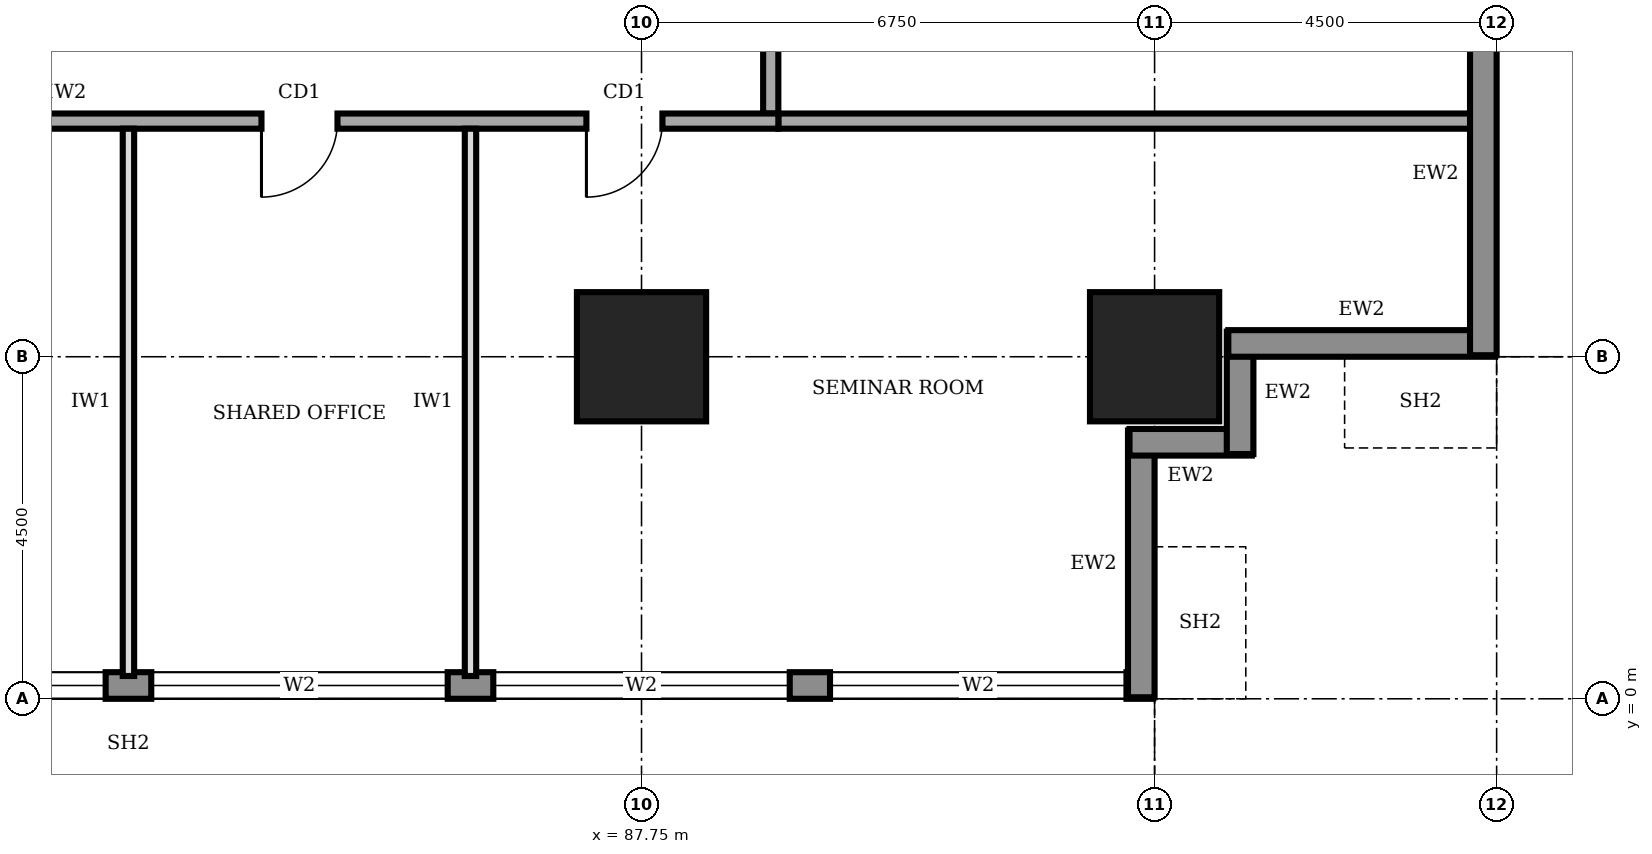
"""IFC4 building model, lengths in metres.
Left out: names, types, materials, properties, quantities, classifications, styles, units other than length and angle.
Written with IfcOpenShell. Run it as: python <this file> out.ifc"""

import sys

from ifc_helpers import new_model, si_unit, direction, frame, frame_2d, origin, origin_2d, place, context, subcontext, project, spatial, rectangle, extrude, element, fill, save


model = new_model("IFC4")
c1 = context("Model", 3, precision=1e-05, world=origin(), true_north=direction((0.0, 1.0)))
c2 = subcontext(c1, "Body", "Model", "MODEL_VIEW")
j1 = project(units=[si_unit("LENGTHUNIT", "METRE"), si_unit("PLANEANGLEUNIT", "RADIAN")], contexts=[c1])
p1 = place(None, origin())
s1 = spatial("IfcSite", under=j1, at=p1, CompositionType="ELEMENT")
p2 = place(p1, origin())
s2 = spatial("IfcBuilding", under=s1, at=p2, CompositionType="ELEMENT")
p3 = place(p2, frame((0.0, 0.0, 69.0)))
s3 = spatial("IfcBuildingStorey", under=s2, at=p3, CompositionType="ELEMENT", Elevation=69.0)
for number, where, z_axis, x_axis in (
    (1, (87.75, 4.5, 0.0), (0.0, 0.0, 1.0), (1.0, 0.0, 0.0)),
    (2, (94.5, 4.5, 0.0), (0.0, 0.0, 1.0), (1.0, 0.0, 0.0)),
):
    element("IfcColumn", number, at=place(p3, frame(where, z_axis=z_axis, x_axis=x_axis)), inside=s3, PredefinedType="COLUMN", context=c2, shape_type="SweptSolid", body=[
        extrude(rectangle(XDim=1.7, YDim=1.7, at=origin_2d()), origin(), (0.0, 0.0, 1.0), 4.0),
    ])
p4 = place(p3, frame((67.52, 0.175, 0.0), z_axis=(0.0, 0.0, 1.0), x_axis=(1.0, 0.0, 0.0)))
e3 = element("IfcWall", 3, at=p4, inside=s3, PredefinedType="STANDARD", context=c2, shape_type="SweptSolid", body=[
    extrude(rectangle(XDim=26.96, YDim=0.35, at=frame_2d((13.48, 0.0))), origin(), (0.0, 0.0, 1.0), 3.75),
])
p5 = place(p4, frame((4.78, 0.0, 0.6)))
e4 = element("IfcOpeningElement", 4, at=p5, cuts=e3, PredefinedType="OPENING", context=c2, shape_type="SweptSolid", body=[
    extrude(rectangle(XDim=3.9, YDim=2.6, at=frame_2d((1.95, 1.3))), frame((0.0, 0.185, 0.0), z_axis=(0.0, -1.0, 0.0), x_axis=(1.0, 0.0, 0.0)), (0.0, 0.0, 1.0), 0.37),
])
p6 = place(p4, frame((9.28, 0.0, 0.6)))
e5 = element("IfcOpeningElement", 5, at=p6, cuts=e3, PredefinedType="OPENING", context=c2, shape_type="SweptSolid", body=[
    extrude(rectangle(XDim=3.9, YDim=2.6, at=frame_2d((1.95, 1.3))), frame((0.0, 0.185, 0.0), z_axis=(0.0, -1.0, 0.0), x_axis=(1.0, 0.0, 0.0)), (0.0, 0.0, 1.0), 0.37),
])
p7 = place(p4, frame((13.78, 0.0, 0.6)))
e6 = element("IfcOpeningElement", 6, at=p7, cuts=e3, PredefinedType="OPENING", context=c2, shape_type="SweptSolid", body=[
    extrude(rectangle(XDim=3.9, YDim=2.6, at=frame_2d((1.95, 1.3))), frame((0.0, 0.185, 0.0), z_axis=(0.0, -1.0, 0.0), x_axis=(1.0, 0.0, 0.0)), (0.0, 0.0, 1.0), 0.37),
])
p8 = place(p4, frame((18.28, 0.0, 0.6)))
e7 = element("IfcOpeningElement", 7, at=p8, cuts=e3, PredefinedType="OPENING", context=c2, shape_type="SweptSolid", body=[
    extrude(rectangle(XDim=3.9, YDim=2.6, at=frame_2d((1.95, 1.3))), frame((0.0, 0.185, 0.0), z_axis=(0.0, -1.0, 0.0), x_axis=(1.0, 0.0, 0.0)), (0.0, 0.0, 1.0), 0.37),
])
p9 = place(p4, frame((22.71, 0.0, 0.6)))
e8 = element("IfcOpeningElement", 8, at=p9, cuts=e3, PredefinedType="OPENING", context=c2, shape_type="SweptSolid", body=[
    extrude(rectangle(XDim=3.9, YDim=2.6, at=frame_2d((1.95, 1.3))), frame((0.0, 0.185, 0.0), z_axis=(0.0, -1.0, 0.0), x_axis=(1.0, 0.0, 0.0)), (0.0, 0.0, 1.0), 0.37),
])
p10 = place(p3, frame((94.325, 0.02, 0.0), z_axis=(0.0, 0.0, 1.0), x_axis=(0.0, 1.0, 0.0)))
e9 = element("IfcWall", 9, at=p10, inside=s3, PredefinedType="STANDARD", context=c2, shape_type="SweptSolid", body=[
    extrude(rectangle(XDim=3.51, YDim=0.35, at=frame_2d((1.755, 0.0))), origin(), (0.0, 0.0, 1.0), 2.85),
])
for number, where, z_axis, x_axis in (
    (10, (94.17, 3.375, 0.0), (0.0, 0.0, 1.0), (1.0, 0.0, 0.0)),
    (11, (95.625, 3.22, 0.0), (0.0, 0.0, 1.0), (0.0, 1.0, 0.0)),
):
    element("IfcWall", number, at=place(p3, frame(where, z_axis=z_axis, x_axis=x_axis)), inside=s3, PredefinedType="STANDARD", context=c2, shape_type="SweptSolid", body=[
        extrude(rectangle(XDim=1.61, YDim=0.35, at=frame_2d((0.805, 0.0))), origin(), (0.0, 0.0, 1.0), 3.75),
    ])
p11 = place(p3, frame((95.47, 4.675, 0.0), z_axis=(0.0, 0.0, 1.0), x_axis=(1.0, 0.0, 0.0)))
e12 = element("IfcWall", 12, at=p11, inside=s3, PredefinedType="STANDARD", context=c2, shape_type="SweptSolid", body=[
    extrude(rectangle(XDim=3.51, YDim=0.35, at=frame_2d((1.755, 0.0))), origin(), (0.0, 0.0, 1.0), 2.85),
])
p12 = place(p3, frame((98.825, 4.52, 0.0), z_axis=(0.0, 0.0, 1.0), x_axis=(0.0, 1.0, 0.0)))
e13 = element("IfcWall", 13, at=p12, inside=s3, PredefinedType="STANDARD", context=c2, shape_type="SweptSolid", body=[
    extrude(rectangle(XDim=31.46, YDim=0.35, at=frame_2d((15.73, 0.0))), origin(), (0.0, 0.0, 1.0), 3.75),
])
p13 = place(p12, frame((4.78, 0.0, 0.6)))
e14 = element("IfcOpeningElement", 14, at=p13, cuts=e13, PredefinedType="OPENING", context=c2, shape_type="SweptSolid", body=[
    extrude(rectangle(XDim=3.9, YDim=2.6, at=frame_2d((1.95, 1.3))), frame((0.0, 0.185, 0.0), z_axis=(0.0, -1.0, 0.0), x_axis=(1.0, 0.0, 0.0)), (0.0, 0.0, 1.0), 0.37),
])
p14 = place(p12, frame((9.28, 0.0, 0.6)))
e15 = element("IfcOpeningElement", 15, at=p14, cuts=e13, PredefinedType="OPENING", context=c2, shape_type="SweptSolid", body=[
    extrude(rectangle(XDim=3.9, YDim=2.6, at=frame_2d((1.95, 1.3))), frame((0.0, 0.185, 0.0), z_axis=(0.0, -1.0, 0.0), x_axis=(1.0, 0.0, 0.0)), (0.0, 0.0, 1.0), 0.37),
])
p15 = place(p12, frame((13.78, 0.0, 0.6)))
e16 = element("IfcOpeningElement", 16, at=p15, cuts=e13, PredefinedType="OPENING", context=c2, shape_type="SweptSolid", body=[
    extrude(rectangle(XDim=3.9, YDim=2.6, at=frame_2d((1.95, 1.3))), frame((0.0, 0.185, 0.0), z_axis=(0.0, -1.0, 0.0), x_axis=(1.0, 0.0, 0.0)), (0.0, 0.0, 1.0), 0.37),
])
p16 = place(p12, frame((18.28, 0.0, 0.6)))
e17 = element("IfcOpeningElement", 17, at=p16, cuts=e13, PredefinedType="OPENING", context=c2, shape_type="SweptSolid", body=[
    extrude(rectangle(XDim=3.9, YDim=2.6, at=frame_2d((1.95, 1.3))), frame((0.0, 0.185, 0.0), z_axis=(0.0, -1.0, 0.0), x_axis=(1.0, 0.0, 0.0)), (0.0, 0.0, 1.0), 0.37),
])
p17 = place(p12, frame((22.78, 0.0, 0.6)))
e18 = element("IfcOpeningElement", 18, at=p17, cuts=e13, PredefinedType="OPENING", context=c2, shape_type="SweptSolid", body=[
    extrude(rectangle(XDim=3.9, YDim=2.6, at=frame_2d((1.95, 1.3))), frame((0.0, 0.185, 0.0), z_axis=(0.0, -1.0, 0.0), x_axis=(1.0, 0.0, 0.0)), (0.0, 0.0, 1.0), 0.37),
])
p18 = place(p12, frame((27.21, 0.0, 0.6)))
e19 = element("IfcOpeningElement", 19, at=p18, cuts=e13, PredefinedType="OPENING", context=c2, shape_type="SweptSolid", body=[
    extrude(rectangle(XDim=3.9, YDim=2.6, at=frame_2d((1.95, 1.3))), frame((0.0, 0.185, 0.0), z_axis=(0.0, -1.0, 0.0), x_axis=(1.0, 0.0, 0.0)), (0.0, 0.0, 1.0), 0.37),
])
p19 = place(p3, frame((72.65, 7.6, 0.0), z_axis=(0.0, 0.0, 1.0), x_axis=(1.0, 0.0, 0.0)))
e20 = element("IfcWall", 20, at=p19, inside=s3, PredefinedType="SOLIDWALL", context=c2, shape_type="SweptSolid", body=[
    extrude(rectangle(XDim=16.9, YDim=0.2, at=frame_2d((8.45, 0.0))), origin(), (0.0, 0.0, 1.0), 3.75),
])
p20 = place(p19, frame((3.175, 0.0, 0.0)))
e21 = element("IfcOpeningElement", 21, at=p20, cuts=e20, PredefinedType="OPENING", context=c2, shape_type="SweptSolid", body=[
    extrude(rectangle(XDim=1.8, YDim=2.1, at=frame_2d((0.9, 1.05))), frame((0.0, 0.11, 0.0), z_axis=(0.0, -1.0, 0.0), x_axis=(1.0, 0.0, 0.0)), (0.0, 0.0, 1.0), 0.22),
])
p21 = place(p19, frame((10.1, 0.0, 0.0)))
e22 = element("IfcOpeningElement", 22, at=p21, cuts=e20, PredefinedType="OPENING", context=c2, shape_type="SweptSolid", body=[
    extrude(rectangle(XDim=1.0, YDim=2.1, at=frame_2d((0.5, 1.05))), frame((0.0, 0.11, 0.0), z_axis=(0.0, -1.0, 0.0), x_axis=(1.0, 0.0, 0.0)), (0.0, 0.0, 1.0), 0.22),
])
p22 = place(p19, frame((14.375, 0.0, 0.0)))
e23 = element("IfcOpeningElement", 23, at=p22, cuts=e20, PredefinedType="OPENING", context=c2, shape_type="SweptSolid", body=[
    extrude(rectangle(XDim=1.0, YDim=2.1, at=frame_2d((0.5, 1.05))), frame((0.0, 0.11, 0.0), z_axis=(0.0, -1.0, 0.0), x_axis=(1.0, 0.0, 0.0)), (0.0, 0.0, 1.0), 0.22),
])
p23 = place(p3, frame((89.45, 7.7, 0.0), z_axis=(0.0, 0.0, 1.0), x_axis=(0.0, 1.0, 0.0)))
e24 = element("IfcWall", 24, at=p23, inside=s3, PredefinedType="SOLIDWALL", context=c2, shape_type="SweptSolid", body=[
    extrude(rectangle(XDim=25.3, YDim=0.2, at=frame_2d((12.65, 0.0))), origin(), (0.0, 0.0, 1.0), 3.75),
])
p24 = place(p23, frame((2.3, 0.0, 0.0)))
e25 = element("IfcOpeningElement", 25, at=p24, cuts=e24, PredefinedType="OPENING", context=c2, shape_type="SweptSolid", body=[
    extrude(rectangle(XDim=1.0, YDim=2.1, at=frame_2d((0.5, 1.05))), frame((0.0, 0.11, 0.0), z_axis=(0.0, -1.0, 0.0), x_axis=(1.0, 0.0, 0.0)), (0.0, 0.0, 1.0), 0.22),
])
p25 = place(p23, frame((6.55, 0.0, 0.0)))
e26 = element("IfcOpeningElement", 26, at=p25, cuts=e24, PredefinedType="OPENING", context=c2, shape_type="SweptSolid", body=[
    extrude(rectangle(XDim=0.9, YDim=2.1, at=frame_2d((0.45, 1.05))), frame((0.0, 0.11, 0.0), z_axis=(0.0, -1.0, 0.0), x_axis=(1.0, 0.0, 0.0)), (0.0, 0.0, 1.0), 0.22),
])
p26 = place(p23, frame((9.75, 0.0, 0.0)))
e27 = element("IfcOpeningElement", 27, at=p26, cuts=e24, PredefinedType="OPENING", context=c2, shape_type="SweptSolid", body=[
    extrude(rectangle(XDim=0.9, YDim=2.1, at=frame_2d((0.45, 1.05))), frame((0.0, 0.11, 0.0), z_axis=(0.0, -1.0, 0.0), x_axis=(1.0, 0.0, 0.0)), (0.0, 0.0, 1.0), 0.22),
])
p27 = place(p23, frame((15.3, 0.0, 0.0)))
e28 = element("IfcOpeningElement", 28, at=p27, cuts=e24, PredefinedType="OPENING", context=c2, shape_type="SweptSolid", body=[
    extrude(rectangle(XDim=0.9, YDim=2.1, at=frame_2d((0.45, 1.05))), frame((0.0, 0.11, 0.0), z_axis=(0.0, -1.0, 0.0), x_axis=(1.0, 0.0, 0.0)), (0.0, 0.0, 1.0), 0.22),
])
p28 = place(p23, frame((17.8, 0.0, 0.0)))
e29 = element("IfcOpeningElement", 29, at=p28, cuts=e24, PredefinedType="OPENING", context=c2, shape_type="SweptSolid", body=[
    extrude(rectangle(XDim=1.0, YDim=2.1, at=frame_2d((0.5, 1.05))), frame((0.0, 0.11, 0.0), z_axis=(0.0, -1.0, 0.0), x_axis=(1.0, 0.0, 0.0)), (0.0, 0.0, 1.0), 0.22),
])
p29 = place(p23, frame((12.7, 0.0, 0.0)))
e30 = element("IfcOpeningElement", 30, at=p29, cuts=e24, PredefinedType="OPENING", context=c2, shape_type="SweptSolid", body=[
    extrude(rectangle(XDim=1.0, YDim=2.1, at=frame_2d((0.5, 1.05))), frame((0.0, 0.11, 0.0), z_axis=(0.0, -1.0, 0.0), x_axis=(1.0, 0.0, 0.0)), (0.0, 0.0, 1.0), 0.22),
])
p30 = place(p23, frame((21.8, 0.0, 0.0)))
e31 = element("IfcOpeningElement", 31, at=p30, cuts=e24, PredefinedType="OPENING", context=c2, shape_type="SweptSolid", body=[
    extrude(rectangle(XDim=1.0, YDim=2.1, at=frame_2d((0.5, 1.05))), frame((0.0, 0.11, 0.0), z_axis=(0.0, -1.0, 0.0), x_axis=(1.0, 0.0, 0.0)), (0.0, 0.0, 1.0), 0.22),
])
p31 = place(p3, frame((89.55, 7.6, 0.0), z_axis=(0.0, 0.0, 1.0), x_axis=(1.0, 0.0, 0.0)))
e32 = element("IfcWall", 32, at=p31, inside=s3, PredefinedType="SOLIDWALL", context=c2, shape_type="SweptSolid", body=[
    extrude(rectangle(XDim=9.15, YDim=0.2, at=frame_2d((4.575, 0.0))), origin(), (0.0, 0.0, 1.0), 3.75),
])
for number, where, z_axis, x_axis in (
    (33, (81.0, 0.3, 0.0), (0.0, 0.0, 1.0), (0.0, 1.0, 0.0)),
    (34, (85.5, 0.3, 0.0), (0.0, 0.0, 1.0), (0.0, 1.0, 0.0)),
):
    element("IfcWall", number, at=place(p3, frame(where, z_axis=z_axis, x_axis=x_axis)), inside=s3, PredefinedType="PARTITIONING", context=c2, shape_type="SweptSolid", body=[
        extrude(rectangle(XDim=7.2, YDim=0.15, at=frame_2d((3.6, 0.0))), origin(), (0.0, 0.0, 1.0), 3.75),
    ])
p32 = place(p6, origin())
e35 = element("IfcWindow", 35, at=p32, inside=s3, PartitioningType="SINGLE_PANEL", PredefinedType="WINDOW", context=c2, shape_type="SweptSolid", body=[
    extrude(rectangle(XDim=3.9, YDim=2.6, at=frame_2d((1.95, 1.3))), frame((0.0, 0.03, 0.0), z_axis=(0.0, -1.0, 0.0), x_axis=(1.0, 0.0, 0.0)), (0.0, 0.0, 1.0), 0.06),
])
fill(e5, e35)
p33 = place(p7, origin())
e36 = element("IfcWindow", 36, at=p33, inside=s3, PartitioningType="SINGLE_PANEL", PredefinedType="WINDOW", context=c2, shape_type="SweptSolid", body=[
    extrude(rectangle(XDim=3.9, YDim=2.6, at=frame_2d((1.95, 1.3))), frame((0.0, 0.03, 0.0), z_axis=(0.0, -1.0, 0.0), x_axis=(1.0, 0.0, 0.0)), (0.0, 0.0, 1.0), 0.06),
])
fill(e6, e36)
p34 = place(p8, origin())
e37 = element("IfcWindow", 37, at=p34, inside=s3, PartitioningType="SINGLE_PANEL", PredefinedType="WINDOW", context=c2, shape_type="SweptSolid", body=[
    extrude(rectangle(XDim=3.9, YDim=2.6, at=frame_2d((1.95, 1.3))), frame((0.0, 0.03, 0.0), z_axis=(0.0, -1.0, 0.0), x_axis=(1.0, 0.0, 0.0)), (0.0, 0.0, 1.0), 0.06),
])
fill(e7, e37)
p35 = place(p9, origin())
e38 = element("IfcWindow", 38, at=p35, inside=s3, PartitioningType="SINGLE_PANEL", PredefinedType="WINDOW", context=c2, shape_type="SweptSolid", body=[
    extrude(rectangle(XDim=3.9, YDim=2.6, at=frame_2d((1.95, 1.3))), frame((0.0, 0.03, 0.0), z_axis=(0.0, -1.0, 0.0), x_axis=(1.0, 0.0, 0.0)), (0.0, 0.0, 1.0), 0.06),
])
fill(e8, e38)
p36 = place(p21, frame((1.0, 0.0, 0.0), z_axis=(0.0, 0.0, 1.0), x_axis=(-1.0, 0.0, 0.0)))
e39 = element("IfcDoor", 39, at=p36, inside=s3, OperationType="SINGLE_SWING_RIGHT", PredefinedType="DOOR", context=c2, shape_type="SweptSolid", body=[
    extrude(rectangle(XDim=1.0, YDim=2.1, at=frame_2d((0.5, 1.05))), frame((0.0, 0.025, 0.0), z_axis=(0.0, -1.0, 0.0), x_axis=(1.0, 0.0, 0.0)), (0.0, 0.0, 1.0), 0.05),
])
fill(e22, e39)
p37 = place(p22, frame((1.0, 0.0, 0.0), z_axis=(0.0, 0.0, 1.0), x_axis=(-1.0, 0.0, 0.0)))
e40 = element("IfcDoor", 40, at=p37, inside=s3, OperationType="SINGLE_SWING_RIGHT", PredefinedType="DOOR", context=c2, shape_type="SweptSolid", body=[
    extrude(rectangle(XDim=1.0, YDim=2.1, at=frame_2d((0.5, 1.05))), frame((0.0, 0.025, 0.0), z_axis=(0.0, -1.0, 0.0), x_axis=(1.0, 0.0, 0.0)), (0.0, 0.0, 1.0), 0.05),
])
fill(e23, e40)
save(model, sys.argv[1])
